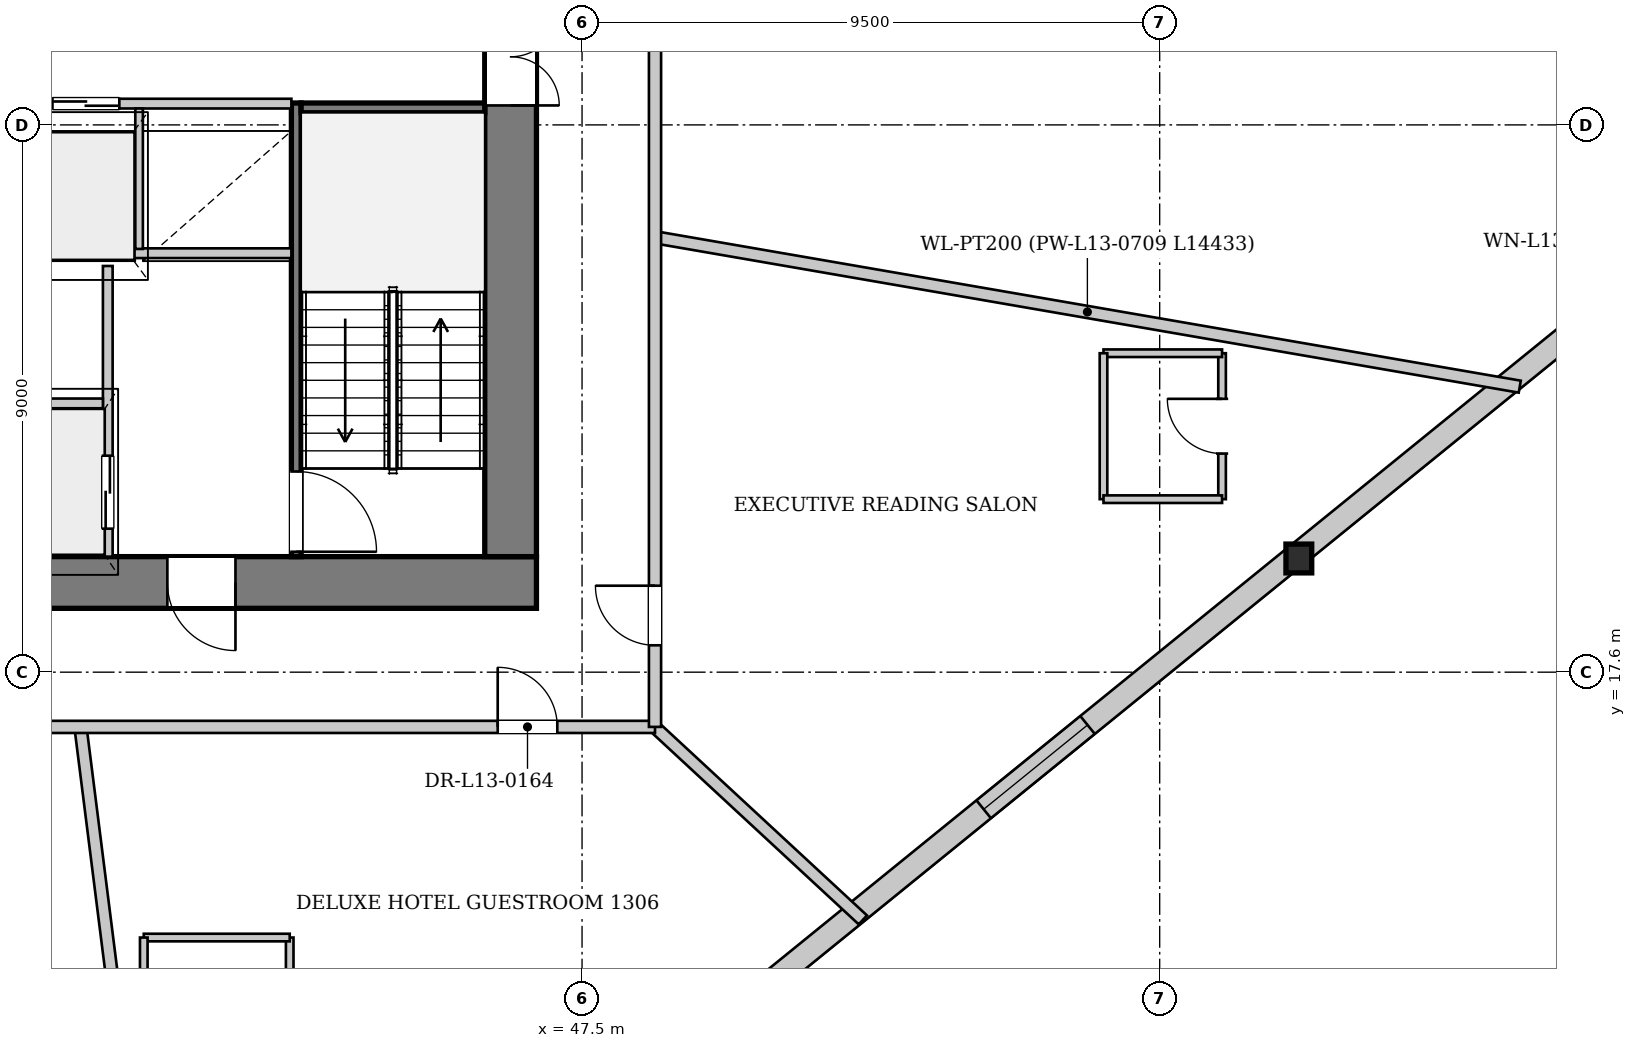
"""IFC4 building model, lengths in metres.
Left out: names, types, materials, properties, quantities, classifications, styles, units other than length and angle.
Written with IfcOpenShell. Run it as: python <this file> out.ifc"""

import sys

from ifc_helpers import new_model, si_unit, direction, frame, frame_2d, origin, origin_2d, place, context, subcontext, project, spatial, rectangle, i_section, extrude, source, transform, mapped, element, fill, save


model = new_model("IFC4")
c1 = context("Model", 3, precision=1e-05, world=origin(), true_north=direction((0.0, 1.0)))
c2 = subcontext(c1, "Body", "Model", "MODEL_VIEW")
j1 = project(units=[si_unit("LENGTHUNIT", "METRE"), si_unit("PLANEANGLEUNIT", "RADIAN")], contexts=[c1])
p1 = place(None, origin())
s1 = spatial("IfcSite", under=j1, at=p1, CompositionType="ELEMENT")
p2 = place(p1, origin())
s2 = spatial("IfcBuilding", under=s1, at=p2, CompositionType="ELEMENT")
p3 = place(p2, frame((0.0, 0.0, 54.15)))
s3 = spatial("IfcBuildingStorey", under=s2, at=p3, CompositionType="ELEMENT", Elevation=54.15)
m1 = source(origin(), c2, "Body", "SweptSolid", [
    extrude(i_section(OverallWidth=0.424, OverallDepth=0.474, WebThickness=0.043, FlangeThickness=0.068, at=origin_2d()), origin(), (0.0, 0.0, 1.0), 3.406),
])
p4 = place(p3, frame((59.256, 19.281, 0.0), z_axis=(0.019063520922, 0.110726089566, 0.993668111222), x_axis=(-0.985500598756, 0.169671947747, 0.0)))
e1 = element("IfcColumn", 1, at=p4, inside=s3, PredefinedType="COLUMN", context=c2, shape_type="MappedRepresentation", body=[
    mapped(m1, transform((0.0, 0.0, 0.0), x_axis=(1.0, 0.0, 0.0), y_axis=(0.0, 1.0, 0.0), z_axis=(0.0, 0.0, 1.0), scale=1.0)),
])
p5 = place(p3, frame((68.629, 27.134, 0.0), z_axis=(0.0, 0.0, 1.0), x_axis=(-0.7764202155, -0.630215557538, 0.0)))
e2 = element("IfcWall", 2, at=p5, inside=s3, PredefinedType="SOLIDWALL", context=c2, shape_type="SweptSolid", body=[
    extrude(rectangle(XDim=24.453, YDim=0.38, at=frame_2d((12.227, 0.0))), origin(), (0.0, 0.0, 1.0), 2.592),
])
p6 = place(p5, frame((4.147, 0.0, 0.222)))
e3 = element("IfcOpeningElement", 3, at=p6, cuts=e2, PredefinedType="OPENING", context=c2, shape_type="SweptSolid", body=[
    extrude(rectangle(XDim=2.2, YDim=2.25, at=frame_2d((1.1, 1.125))), frame((0.0, 0.2, 0.0), z_axis=(0.0, -1.0, 0.0), x_axis=(1.0, 0.0, 0.0)), (0.0, 0.0, 1.0), 0.4),
])
p7 = place(p5, frame((16.506, 0.0, 0.222)))
e4 = element("IfcOpeningElement", 4, at=p7, cuts=e2, PredefinedType="OPENING", context=c2, shape_type="SweptSolid", body=[
    extrude(rectangle(XDim=2.2, YDim=2.25, at=frame_2d((1.1, 1.125))), frame((0.0, 0.2, 0.0), z_axis=(0.0, -1.0, 0.0), x_axis=(1.0, 0.0, 0.0)), (0.0, 0.0, 1.0), 0.4),
])
p8 = place(p3, frame((46.75, 19.075, 0.0), z_axis=(0.0, 0.0, 1.0), x_axis=(-1.0, 0.0, 0.0)))
e5 = element("IfcWall", 5, at=p8, inside=s3, PredefinedType="SHEAR", context=c2, shape_type="SweptSolid", body=[
    extrude(rectangle(XDim=17.5, YDim=0.85, at=frame_2d((8.75, 0.0))), origin(), (0.0, 0.0, 1.0), 3.3),
])
p9 = place(p8, frame((4.95, 0.0, 0.0)))
e6 = element("IfcOpeningElement", 6, at=p9, cuts=e5, PredefinedType="OPENING", context=c2, shape_type="SweptSolid", body=[
    extrude(rectangle(XDim=1.12, YDim=2.25, at=frame_2d((0.56, 1.125))), frame((0.0, 0.435, 0.0), z_axis=(0.0, -1.0, 0.0), x_axis=(1.0, 0.0, 0.0)), (0.0, 0.0, 1.0), 0.87),
])
p10 = place(p8, frame((11.45, 0.0, 0.0)))
e7 = element("IfcOpeningElement", 7, at=p10, cuts=e5, PredefinedType="OPENING", context=c2, shape_type="SweptSolid", body=[
    extrude(rectangle(XDim=1.12, YDim=2.25, at=frame_2d((0.56, 1.125))), frame((0.0, 0.435, 0.0), z_axis=(0.0, -1.0, 0.0), x_axis=(1.0, 0.0, 0.0)), (0.0, 0.0, 1.0), 0.87),
])
p11 = place(p3, frame((46.325, 33.7, 0.0), z_axis=(0.0, 0.0, 1.0), x_axis=(0.0, -1.0, 0.0)))
e8 = element("IfcWall", 8, at=p11, inside=s3, PredefinedType="SHEAR", context=c2, shape_type="SweptSolid", body=[
    extrude(rectangle(XDim=14.2, YDim=0.85, at=frame_2d((7.1, 0.0))), origin(), (0.0, 0.0, 1.0), 3.3),
])
p12 = place(p11, frame((5.18, 0.0, 0.0)))
e9 = element("IfcOpeningElement", 9, at=p12, cuts=e8, PredefinedType="OPENING", context=c2, shape_type="SweptSolid", body=[
    extrude(rectangle(XDim=1.6, YDim=2.2, at=frame_2d((0.8, 1.1))), frame((0.0, 0.435, 0.0), z_axis=(0.0, -1.0, 0.0), x_axis=(1.0, 0.0, 0.0)), (0.0, 0.0, 1.0), 0.87),
])
p13 = place(p3, frame((42.8, 26.96, 0.0), z_axis=(0.0, 0.0, 1.0), x_axis=(0.0, -1.0, 0.0)))
e10 = element("IfcWall", 10, at=p13, inside=s3, PredefinedType="PARTITIONING", context=c2, shape_type="SweptSolid", body=[
    extrude(rectangle(XDim=7.46, YDim=0.16, at=frame_2d((3.73, 0.0))), origin(), (0.0, 0.0, 1.0), 3.3),
])
p14 = place(p13, frame((6.06, 0.0, 0.0)))
e11 = element("IfcOpeningElement", 11, at=p14, cuts=e10, PredefinedType="OPENING", context=c2, shape_type="SweptSolid", body=[
    extrude(rectangle(XDim=1.32, YDim=2.2, at=frame_2d((0.66, 1.1))), frame((0.0, 0.09, 0.0), z_axis=(0.0, -1.0, 0.0), x_axis=(1.0, 0.0, 0.0)), (0.0, 0.0, 1.0), 0.18),
])
p15 = place(p3, frame((42.88, 26.88, 0.0), z_axis=(0.0, 0.0, 1.0), x_axis=(1.0, 0.0, 0.0)))
e12 = element("IfcWall", 12, at=p15, inside=s3, PredefinedType="PARTITIONING", context=c2, shape_type="SweptSolid", body=[
    extrude(rectangle(XDim=3.02, YDim=0.16, at=frame_2d((1.51, 0.0))), origin(), (0.0, 0.0, 1.0), 3.3),
])
p16 = place(p3, frame((39.7, 24.28, 0.0), z_axis=(0.0, 0.0, 1.0), x_axis=(0.0, -1.0, 0.0)))
e13 = element("IfcWall", 13, at=p16, inside=s3, PredefinedType="PARTITIONING", context=c2, shape_type="SweptSolid", body=[
    extrude(rectangle(XDim=4.78, YDim=0.16, at=frame_2d((2.39, 0.0))), origin(), (0.0, 0.0, 1.0), 3.3),
])
p17 = place(p16, frame((3.12, 0.0, 0.0)))
e14 = element("IfcOpeningElement", 14, at=p17, cuts=e13, PredefinedType="OPENING", context=c2, shape_type="SweptSolid", body=[
    extrude(rectangle(XDim=1.2, YDim=2.2, at=frame_2d((0.6, 1.1))), frame((0.0, 0.09, 0.0), z_axis=(0.0, -1.0, 0.0), x_axis=(1.0, 0.0, 0.0)), (0.0, 0.0, 1.0), 0.18),
])
p18 = place(p3, frame((36.38, 22.02, 0.0), z_axis=(0.0, 0.0, 1.0), x_axis=(1.0, 0.0, 0.0)))
e15 = element("IfcWall", 15, at=p18, inside=s3, PredefinedType="PARTITIONING", context=c2, shape_type="SweptSolid", body=[
    extrude(rectangle(XDim=3.24, YDim=0.16, at=frame_2d((1.62, 0.0))), origin(), (0.0, 0.0, 1.0), 3.3),
])
p19 = place(p3, frame((33.28, 24.49, 0.0), z_axis=(0.0, 0.0, 1.0), x_axis=(1.0, 0.0, 0.0)))
e16 = element("IfcWall", 16, at=p19, inside=s3, PredefinedType="PARTITIONING", context=c2, shape_type="SweptSolid", body=[
    extrude(rectangle(XDim=9.44, YDim=0.16, at=frame_2d((4.72, 0.0))), origin(), (0.0, 0.0, 1.0), 3.3),
])
p20 = place(p3, frame((33.28, 26.95, 0.0), z_axis=(0.0, 0.0, 1.0), x_axis=(1.0, 0.0, 0.0)))
e17 = element("IfcWall", 17, at=p20, inside=s3, PredefinedType="PARTITIONING", context=c2, shape_type="SweptSolid", body=[
    extrude(rectangle(XDim=9.44, YDim=0.16, at=frame_2d((4.72, 0.0))), origin(), (0.0, 0.0, 1.0), 3.3),
])
p21 = place(p20, frame((0.26, 0.0, 0.0)))
e18 = element("IfcOpeningElement", 18, at=p21, cuts=e17, PredefinedType="OPENING", context=c2, shape_type="SweptSolid", body=[
    extrude(rectangle(XDim=1.1, YDim=2.2, at=frame_2d((0.55, 1.1))), frame((0.0, 0.09, 0.0), z_axis=(0.0, -1.0, 0.0), x_axis=(1.0, 0.0, 0.0)), (0.0, 0.0, 1.0), 0.18),
])
p22 = place(p20, frame((2.01, 0.0, 0.0)))
e19 = element("IfcOpeningElement", 19, at=p22, cuts=e17, PredefinedType="OPENING", context=c2, shape_type="SweptSolid", body=[
    extrude(rectangle(XDim=1.1, YDim=2.2, at=frame_2d((0.55, 1.1))), frame((0.0, 0.09, 0.0), z_axis=(0.0, -1.0, 0.0), x_axis=(1.0, 0.0, 0.0)), (0.0, 0.0, 1.0), 0.18),
])
p23 = place(p20, frame((3.76, 0.0, 0.0)))
e20 = element("IfcOpeningElement", 20, at=p23, cuts=e17, PredefinedType="OPENING", context=c2, shape_type="SweptSolid", body=[
    extrude(rectangle(XDim=1.1, YDim=2.2, at=frame_2d((0.55, 1.1))), frame((0.0, 0.09, 0.0), z_axis=(0.0, -1.0, 0.0), x_axis=(1.0, 0.0, 0.0)), (0.0, 0.0, 1.0), 0.18),
])
p24 = place(p20, frame((5.51, 0.0, 0.0)))
e21 = element("IfcOpeningElement", 21, at=p24, cuts=e17, PredefinedType="OPENING", context=c2, shape_type="SweptSolid", body=[
    extrude(rectangle(XDim=1.1, YDim=2.2, at=frame_2d((0.55, 1.1))), frame((0.0, 0.09, 0.0), z_axis=(0.0, -1.0, 0.0), x_axis=(1.0, 0.0, 0.0)), (0.0, 0.0, 1.0), 0.18),
])
p25 = place(p3, frame((40.215, 24.56, 0.0), z_axis=(0.0, 0.0, 1.0), x_axis=(0.0, 1.0, 0.0)))
e22 = element("IfcWall", 22, at=p25, inside=s3, PredefinedType="PARTITIONING", context=c2, shape_type="SweptSolid", body=[
    extrude(rectangle(XDim=2.31, YDim=0.125, at=frame_2d((1.155, 0.0))), origin(), (0.0, 0.0, 1.0), 3.3),
])
p26 = place(p3, frame((48.7, 24.752, 0.0), z_axis=(0.0, 0.0, 1.0), x_axis=(0.985408012734, -0.170208837727, 0.0)))
e23 = element("IfcWall", 23, at=p26, inside=s3, PredefinedType="PARTITIONING", context=c2, shape_type="SweptSolid", body=[
    extrude(rectangle(XDim=14.433, YDim=0.2, at=frame_2d((7.216, 0.0))), origin(), (0.0, 0.0, 1.0), 3.3),
])
p27 = place(p3, frame((39.251, 16.7, 0.0), z_axis=(0.0, 0.0, 1.0), x_axis=(0.125310369071, -0.992117589504, 0.0)))
e24 = element("IfcWall", 24, at=p27, inside=s3, PredefinedType="PARTITIONING", context=c2, shape_type="SweptSolid", body=[
    extrude(rectangle(XDim=8.173, YDim=0.2, at=frame_2d((4.086, 0.0))), origin(), (0.0, 0.0, 1.0), 3.3),
])
p28 = place(p3, frame((48.691, 16.7, 0.0), z_axis=(0.0, 0.0, 1.0), x_axis=(0.733736548666, -0.679434085951, 0.0)))
e25 = element("IfcWall", 25, at=p28, inside=s3, PredefinedType="PARTITIONING", context=c2, shape_type="SweptSolid", body=[
    extrude(rectangle(XDim=4.671, YDim=0.2, at=frame_2d((2.336, 0.0))), origin(), (0.0, 0.0, 1.0), 3.3),
])
p29 = place(p3, frame((42.692, 11.286, 0.0), z_axis=(0.0, 0.0, 1.0), x_axis=(0.0, 1.0, 0.0)))
e26 = element("IfcWall", 26, at=p29, inside=s3, PredefinedType="PARTITIONING", context=c2, shape_type="SweptSolid", body=[
    extrude(rectangle(XDim=1.95, YDim=0.125, at=frame_2d((0.975, 0.0))), origin(), (0.0, 0.0, 1.0), 3.3),
])
p30 = place(p29, frame((0.525, 0.0, 0.0)))
e27 = element("IfcOpeningElement", 27, at=p30, cuts=e26, PredefinedType="OPENING", context=c2, shape_type="SweptSolid", body=[
    extrude(rectangle(XDim=0.9, YDim=2.1, at=frame_2d((0.45, 1.05))), frame((0.0, 0.073, 0.0), z_axis=(0.0, -1.0, 0.0), x_axis=(1.0, 0.0, 0.0)), (0.0, 0.0, 1.0), 0.145),
])
p31 = place(p3, frame((42.692, 13.236, 0.0), z_axis=(0.0, 0.0, 1.0), x_axis=(-1.0, 0.0, 0.0)))
e28 = element("IfcWall", 28, at=p31, inside=s3, PredefinedType="PARTITIONING", context=c2, shape_type="SweptSolid", body=[
    extrude(rectangle(XDim=2.4, YDim=0.125, at=frame_2d((1.2, 0.0))), origin(), (0.0, 0.0, 1.0), 2.925),
])
p32 = place(p3, frame((40.292, 13.236, 0.0), z_axis=(0.0, 0.0, 1.0), x_axis=(0.0, -1.0, 0.0)))
e29 = element("IfcWall", 29, at=p32, inside=s3, PredefinedType="PARTITIONING", context=c2, shape_type="SweptSolid", body=[
    extrude(rectangle(XDim=1.95, YDim=0.125, at=frame_2d((0.975, 0.0))), origin(), (0.0, 0.0, 1.0), 3.3),
])
p33 = place(p3, frame((58.026, 20.445, 0.0), z_axis=(0.0, 0.0, 1.0), x_axis=(0.0, 1.0, 0.0)))
e30 = element("IfcWall", 30, at=p33, inside=s3, PredefinedType="PARTITIONING", context=c2, shape_type="SweptSolid", body=[
    extrude(rectangle(XDim=2.4, YDim=0.125, at=frame_2d((1.2, 0.0))), origin(), (0.0, 0.0, 1.0), 3.3),
])
p34 = place(p33, frame((0.75, 0.0, 0.0)))
e31 = element("IfcOpeningElement", 31, at=p34, cuts=e30, PredefinedType="OPENING", context=c2, shape_type="SweptSolid", body=[
    extrude(rectangle(XDim=0.9, YDim=2.1, at=frame_2d((0.45, 1.05))), frame((0.0, 0.073, 0.0), z_axis=(0.0, -1.0, 0.0), x_axis=(1.0, 0.0, 0.0)), (0.0, 0.0, 1.0), 0.145),
])
p35 = place(p3, frame((58.026, 22.845, 0.0), z_axis=(0.0, 0.0, 1.0), x_axis=(-1.0, 0.0, 0.0)))
e32 = element("IfcWall", 32, at=p35, inside=s3, PredefinedType="PARTITIONING", context=c2, shape_type="SweptSolid", body=[
    extrude(rectangle(XDim=1.95, YDim=0.125, at=frame_2d((0.975, 0.0))), origin(), (0.0, 0.0, 1.0), 3.3),
])
p36 = place(p3, frame((56.076, 22.845, 0.0), z_axis=(0.0, 0.0, 1.0), x_axis=(0.0, -1.0, 0.0)))
e33 = element("IfcWall", 33, at=p36, inside=s3, PredefinedType="PARTITIONING", context=c2, shape_type="SweptSolid", body=[
    extrude(rectangle(XDim=2.4, YDim=0.125, at=frame_2d((1.2, 0.0))), origin(), (0.0, 0.0, 1.0), 3.3),
])
p37 = place(p3, frame((56.076, 20.445, 0.0), z_axis=(0.0, 0.0, 1.0), x_axis=(1.0, 0.0, 0.0)))
e34 = element("IfcWall", 34, at=p37, inside=s3, PredefinedType="PARTITIONING", context=c2, shape_type="SweptSolid", body=[
    extrude(rectangle(XDim=1.95, YDim=0.125, at=frame_2d((0.975, 0.0))), origin(), (0.0, 0.0, 1.0), 3.3),
])
p38 = place(p3, frame((27.3, 16.7, 0.0), z_axis=(0.0, 0.0, 1.0), x_axis=(1.0, 0.0, 0.0)))
e35 = element("IfcWall", 35, at=p38, inside=s3, PredefinedType="PARTITIONING", context=c2, shape_type="SweptSolid", body=[
    extrude(rectangle(XDim=21.4, YDim=0.2, at=frame_2d((10.7, 0.0))), origin(), (0.0, 0.0, 1.0), 3.3),
])
p39 = place(p38, frame((0.3, 0.0, 0.0)))
e36 = element("IfcOpeningElement", 36, at=p39, cuts=e35, PredefinedType="OPENING", context=c2, shape_type="SweptSolid", body=[
    extrude(rectangle(XDim=0.98, YDim=2.15, at=frame_2d((0.49, 1.075))), frame((0.0, 0.11, 0.0), z_axis=(0.0, -1.0, 0.0), x_axis=(1.0, 0.0, 0.0)), (0.0, 0.0, 1.0), 0.22),
])
p40 = place(p38, frame((6.74, 0.0, 0.0)))
e37 = element("IfcOpeningElement", 37, at=p40, cuts=e35, PredefinedType="OPENING", context=c2, shape_type="SweptSolid", body=[
    extrude(rectangle(XDim=0.98, YDim=2.15, at=frame_2d((0.49, 1.075))), frame((0.0, 0.11, 0.0), z_axis=(0.0, -1.0, 0.0), x_axis=(1.0, 0.0, 0.0)), (0.0, 0.0, 1.0), 0.22),
])
p41 = place(p38, frame((18.813, 0.0, 0.0)))
e38 = element("IfcOpeningElement", 38, at=p41, cuts=e35, PredefinedType="OPENING", context=c2, shape_type="SweptSolid", body=[
    extrude(rectangle(XDim=0.98, YDim=2.15, at=frame_2d((0.49, 1.075))), frame((0.0, 0.11, 0.0), z_axis=(0.0, -1.0, 0.0), x_axis=(1.0, 0.0, 0.0)), (0.0, 0.0, 1.0), 0.22),
])
p42 = place(p3, frame((48.7, 16.7, 0.0), z_axis=(0.0, 0.0, 1.0), x_axis=(0.0, 1.0, 0.0)))
e39 = element("IfcWall", 39, at=p42, inside=s3, PredefinedType="PARTITIONING", context=c2, shape_type="SweptSolid", body=[
    extrude(rectangle(XDim=19.8, YDim=0.2, at=frame_2d((9.9, 0.0))), origin(), (0.0, 0.0, 1.0), 3.3),
])
p43 = place(p42, frame((1.342, 0.0, 0.0)))
e40 = element("IfcOpeningElement", 40, at=p43, cuts=e39, PredefinedType="OPENING", context=c2, shape_type="SweptSolid", body=[
    extrude(rectangle(XDim=0.98, YDim=2.15, at=frame_2d((0.49, 1.075))), frame((0.0, 0.11, 0.0), z_axis=(0.0, -1.0, 0.0), x_axis=(1.0, 0.0, 0.0)), (0.0, 0.0, 1.0), 0.22),
])
m2 = source(origin(), c2, "Body", "SweptSolid", [
    extrude(rectangle(XDim=2.2, YDim=2.25, at=frame_2d((1.1, 1.125))), frame((0.0, 0.03, 0.0), z_axis=(0.0, -1.0, 0.0), x_axis=(1.0, 0.0, 0.0)), (0.0, 0.0, 1.0), 0.06),
])
p44 = place(p7, origin())
e41 = element("IfcWindow", 41, at=p44, inside=s3, PartitioningType="SINGLE_PANEL", PredefinedType="WINDOW", context=c2, shape_type="MappedRepresentation", body=[
    mapped(m2, transform((0.0, 0.0, 0.0), x_axis=(1.0, 0.0, 0.0), y_axis=(0.0, 1.0, 0.0), z_axis=(0.0, 0.0, 1.0), scale=1.0)),
])
fill(e4, e41)
m3 = source(origin(), c2, "Body", "SweptSolid", [
    extrude(rectangle(XDim=1.12, YDim=2.25, at=frame_2d((0.56, 1.125))), frame((0.0, 0.025, 0.0), z_axis=(0.0, -1.0, 0.0), x_axis=(1.0, 0.0, 0.0)), (0.0, 0.0, 1.0), 0.05),
])
p45 = place(p9, origin())
e42 = element("IfcDoor", 42, at=p45, inside=s3, OperationType="SINGLE_SWING_LEFT", PredefinedType="DOOR", context=c2, shape_type="MappedRepresentation", body=[
    mapped(m3, transform((0.0, 0.0, 0.0), x_axis=(1.0, 0.0, 0.0), y_axis=(0.0, 1.0, 0.0), z_axis=(0.0, 0.0, 1.0), scale=1.0)),
])
fill(e6, e42)
m4 = source(origin(), c2, "Body", "SweptSolid", [
    extrude(rectangle(XDim=1.6, YDim=2.2, at=frame_2d((0.8, 1.1))), frame((0.0, 0.025, 0.0), z_axis=(0.0, -1.0, 0.0), x_axis=(1.0, 0.0, 0.0)), (0.0, 0.0, 1.0), 0.05),
])
p46 = place(p12, origin())
e43 = element("IfcDoor", 43, at=p46, inside=s3, OperationType="DOUBLE_DOOR_SINGLE_SWING", PredefinedType="DOOR", context=c2, shape_type="MappedRepresentation", body=[
    mapped(m4, transform((0.0, 0.0, 0.0), x_axis=(1.0, 0.0, 0.0), y_axis=(0.0, 1.0, 0.0), z_axis=(0.0, 0.0, 1.0), scale=1.0)),
])
fill(e9, e43)
m5 = source(origin(), c2, "Body", "SweptSolid", [
    extrude(rectangle(XDim=1.32, YDim=2.2, at=frame_2d((0.66, 1.1))), frame((0.0, 0.025, 0.0), z_axis=(0.0, -1.0, 0.0), x_axis=(1.0, 0.0, 0.0)), (0.0, 0.0, 1.0), 0.05),
])
p47 = place(p14, origin())
e44 = element("IfcDoor", 44, at=p47, inside=s3, OperationType="SINGLE_SWING_RIGHT", PredefinedType="DOOR", context=c2, shape_type="MappedRepresentation", body=[
    mapped(m5, transform((0.0, 0.0, 0.0), x_axis=(1.0, 0.0, 0.0), y_axis=(0.0, 1.0, 0.0), z_axis=(0.0, 0.0, 1.0), scale=1.0)),
])
fill(e11, e44)
m6 = source(origin(), c2, "Body", "SweptSolid", [
    extrude(rectangle(XDim=1.2, YDim=2.2, at=frame_2d((0.6, 1.1))), frame((0.0, 0.025, 0.0), z_axis=(0.0, -1.0, 0.0), x_axis=(1.0, 0.0, 0.0)), (0.0, 0.0, 1.0), 0.05),
])
p48 = place(p17, origin())
e45 = element("IfcDoor", 45, at=p48, inside=s3, OperationType="DOUBLE_DOOR_SLIDING", PredefinedType="DOOR", context=c2, shape_type="MappedRepresentation", body=[
    mapped(m6, transform((0.0, 0.0, 0.0), x_axis=(1.0, 0.0, 0.0), y_axis=(0.0, 1.0, 0.0), z_axis=(0.0, 0.0, 1.0), scale=1.0)),
])
fill(e14, e45)
m7 = source(origin(), c2, "Body", "SweptSolid", [
    extrude(rectangle(XDim=1.1, YDim=2.2, at=frame_2d((0.55, 1.1))), frame((0.0, 0.025, 0.0), z_axis=(0.0, -1.0, 0.0), x_axis=(1.0, 0.0, 0.0)), (0.0, 0.0, 1.0), 0.05),
])
p49 = place(p24, origin())
e46 = element("IfcDoor", 46, at=p49, inside=s3, OperationType="DOUBLE_DOOR_SLIDING", PredefinedType="DOOR", context=c2, shape_type="MappedRepresentation", body=[
    mapped(m7, transform((0.0, 0.0, 0.0), x_axis=(1.0, 0.0, 0.0), y_axis=(0.0, 1.0, 0.0), z_axis=(0.0, 0.0, 1.0), scale=1.0)),
])
fill(e21, e46)
m8 = source(origin(), c2, "Body", "SweptSolid", [
    extrude(rectangle(XDim=0.9, YDim=2.1, at=frame_2d((0.45, 1.05))), frame((0.0, 0.025, 0.0), z_axis=(0.0, -1.0, 0.0), x_axis=(1.0, 0.0, 0.0)), (0.0, 0.0, 1.0), 0.05),
])
p50 = place(p34, origin())
e47 = element("IfcDoor", 47, at=p50, inside=s3, OperationType="SINGLE_SWING_RIGHT", PredefinedType="DOOR", context=c2, shape_type="MappedRepresentation", body=[
    mapped(m8, transform((0.0, 0.0, 0.0), x_axis=(1.0, 0.0, 0.0), y_axis=(0.0, 1.0, 0.0), z_axis=(0.0, 0.0, 1.0), scale=1.0)),
])
fill(e31, e47)
m9 = source(origin(), c2, "Body", "SweptSolid", [
    extrude(rectangle(XDim=0.98, YDim=2.15, at=frame_2d((0.49, 1.075))), frame((0.0, 0.025, 0.0), z_axis=(0.0, -1.0, 0.0), x_axis=(1.0, 0.0, 0.0)), (0.0, 0.0, 1.0), 0.05),
])
p51 = place(p41, origin())
e48 = element("IfcDoor", 48, at=p51, inside=s3, OperationType="SINGLE_SWING_LEFT", PredefinedType="DOOR", context=c2, shape_type="MappedRepresentation", body=[
    mapped(m9, transform((0.0, 0.0, 0.0), x_axis=(1.0, 0.0, 0.0), y_axis=(0.0, 1.0, 0.0), z_axis=(0.0, 0.0, 1.0), scale=1.0)),
])
fill(e38, e48)
p52 = place(p43, origin())
e49 = element("IfcDoor", 49, at=p52, inside=s3, OperationType="SINGLE_SWING_RIGHT", PredefinedType="DOOR", context=c2, shape_type="MappedRepresentation", body=[
    mapped(m9, transform((0.0, 0.0, 0.0), x_axis=(1.0, 0.0, 0.0), y_axis=(0.0, 1.0, 0.0), z_axis=(0.0, 0.0, 1.0), scale=1.0)),
])
fill(e40, e49)
save(model, sys.argv[1])
